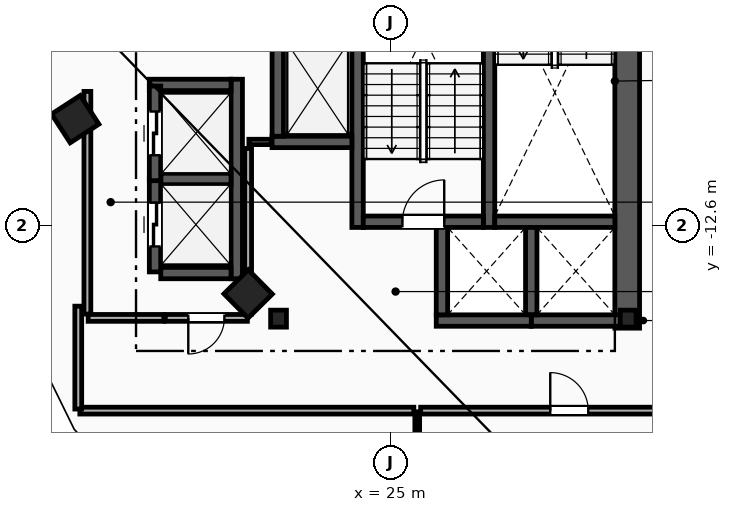
"""IFC4 building model, lengths in metres.
Left out: names, types, materials, properties, quantities, classifications, styles, units other than length and angle.
Written with IfcOpenShell. Run it as: python <this file> out.ifc"""

import sys

from ifc_helpers import new_model, si_unit, direction, frame, frame_2d, origin, origin_2d, place, context, subcontext, project, spatial, rectangle, i_section, extrude, element, fill, save


model = new_model("IFC4")
c1 = context("Model", 3, precision=1e-05, world=origin(), true_north=direction((0.0, 1.0)))
c2 = subcontext(c1, "Body", "Model", "MODEL_VIEW")
j1 = project(units=[si_unit("LENGTHUNIT", "METRE"), si_unit("PLANEANGLEUNIT", "RADIAN")], contexts=[c1])
p1 = place(None, origin())
s1 = spatial("IfcSite", under=j1, at=p1, CompositionType="ELEMENT")
p2 = place(p1, origin())
s2 = spatial("IfcBuilding", under=s1, at=p2, CompositionType="ELEMENT")
p3 = place(p2, frame((0.0, 0.0, 213.4)))
s3 = spatial("IfcBuildingStorey", under=s2, at=p3, CompositionType="ELEMENT", Elevation=213.4)
for number, where, z_axis, x_axis in (
    (1, (22.05, -15.05, 0.0), (0.0, 0.0, 1.0), (1.0, 0.0, 0.0)),
    (2, (31.25, -15.05, 0.0), (0.0, 0.0, 1.0), (1.0, 0.0, 0.0)),
):
    element("IfcColumn", number, at=place(p3, frame(where, z_axis=z_axis, x_axis=x_axis)), inside=s3, PredefinedType="COLUMN", context=c2, shape_type="SweptSolid", body=[
        extrude(i_section(OverallWidth=0.416, OverallDepth=0.446, WebThickness=0.039, FlangeThickness=0.063, FilletRadius=0.018, at=origin_2d()), origin(), (0.0, 0.0, 1.0), 3.6),
    ])
for number, where, z_axis, x_axis in (
    (3, (16.7, -9.8, 0.0), (0.0, 0.0, 1.0), (0.544, -0.839, 0.0)),
    (4, (21.25, -14.4, 0.0), (0.0, 0.0, 1.0), (0.703, -0.711, 0.0)),
):
    element("IfcColumn", number, at=place(p3, frame(where, z_axis=z_axis, x_axis=x_axis)), inside=s3, PredefinedType="COLUMN", context=c2, shape_type="SweptSolid", body=[
        extrude(rectangle(XDim=0.9, YDim=0.9, at=origin_2d()), origin(), (0.0, 0.0, 1.0), 3.6),
    ])
p4 = place(p3, frame((31.225, -15.3, 0.0), z_axis=(0.0, 0.0, 1.0), x_axis=(0.0, 1.0, 0.0)))
e5 = element("IfcWall", 5, at=p4, inside=s3, PredefinedType="SHEAR", context=c2, shape_type="SweptSolid", body=[
    extrude(rectangle(XDim=13.33, YDim=0.65, at=frame_2d((6.665, 0.0))), origin(), (0.0, 0.0, 1.0), 3.34),
])
for number, where, z_axis, x_axis in (
    (6, (27.59, -12.65, 0.0), (0.0, 0.0, 1.0), (0.0, 1.0, 0.0)),
    (7, (24.13, -12.65, 0.0), (0.0, 0.0, 1.0), (0.0, 1.0, 0.0)),
):
    element("IfcWall", number, at=place(p3, frame(where, z_axis=z_axis, x_axis=x_axis)), inside=s3, PredefinedType="SHEAR", context=c2, shape_type="SweptSolid", body=[
        extrude(rectangle(XDim=10.68, YDim=0.3, at=frame_2d((5.34, 0.0))), origin(), (0.0, 0.0, 1.0), 3.34),
    ])
p5 = place(p3, frame((27.74, -12.5, 0.0), z_axis=(0.0, 0.0, 1.0), x_axis=(1.0, 0.0, 0.0)))
e8 = element("IfcWall", 8, at=p5, inside=s3, PredefinedType="SHEAR", context=c2, shape_type="SweptSolid", body=[
    extrude(rectangle(XDim=3.16, YDim=0.3, at=frame_2d((1.58, 0.0))), origin(), (0.0, 0.0, 1.0), 3.34),
])
p6 = place(p3, frame((24.28, -12.5, 0.0), z_axis=(0.0, 0.0, 1.0), x_axis=(1.0, 0.0, 0.0)))
e9 = element("IfcWall", 9, at=p6, inside=s3, PredefinedType="SHEAR", context=c2, shape_type="SweptSolid", body=[
    extrude(rectangle(XDim=3.16, YDim=0.3, at=frame_2d((1.58, 0.0))), origin(), (0.0, 0.0, 1.0), 3.34),
])
p7 = place(p6, frame((1.03, 0.0, 0.0)))
e10 = element("IfcOpeningElement", 10, at=p7, cuts=e9, PredefinedType="OPENING", context=c2, shape_type="SweptSolid", body=[
    extrude(rectangle(XDim=1.1, YDim=2.15, at=frame_2d((0.55, 1.075))), frame((0.0, 0.16, 0.0), z_axis=(0.0, -1.0, 0.0), x_axis=(1.0, 0.0, 0.0)), (0.0, 0.0, 1.0), 0.32),
])
p8 = place(p3, frame((21.88, -10.4, 0.0), z_axis=(0.0, 0.0, 1.0), x_axis=(1.0, 0.0, 0.0)))
e11 = element("IfcWall", 11, at=p8, inside=s3, PredefinedType="SHEAR", context=c2, shape_type="SweptSolid", body=[
    extrude(rectangle(XDim=2.1, YDim=0.3, at=frame_2d((1.05, 0.0))), origin(), (0.0, 0.0, 1.0), 3.34),
])
for number, where, z_axis, x_axis in (
    (12, (22.03, -10.25, 0.0), (0.0, 0.0, 1.0), (0.0, 1.0, 0.0)),
    (13, (28.7, -15.1, 0.0), (0.0, 0.0, 1.0), (1.0, 0.0, 0.0)),
):
    element("IfcWall", number, at=place(p3, frame(where, z_axis=z_axis, x_axis=x_axis)), inside=s3, PredefinedType="SHEAR", context=c2, shape_type="SweptSolid", body=[
        extrude(rectangle(XDim=2.5, YDim=0.3, at=frame_2d((1.25, 0.0))), origin(), (0.0, 0.0, 1.0), 3.34),
    ])
p9 = place(p3, frame((28.7, -14.95, 0.0), z_axis=(0.0, 0.0, 1.0), x_axis=(0.0, 1.0, 0.0)))
e14 = element("IfcWall", 14, at=p9, inside=s3, PredefinedType="SHEAR", context=c2, shape_type="SweptSolid", body=[
    extrude(rectangle(XDim=2.3, YDim=0.3, at=frame_2d((1.15, 0.0))), origin(), (0.0, 0.0, 1.0), 3.34),
])
p10 = place(p3, frame((26.2, -15.1, 0.0), z_axis=(0.0, 0.0, 1.0), x_axis=(1.0, 0.0, 0.0)))
e15 = element("IfcWall", 15, at=p10, inside=s3, PredefinedType="SHEAR", context=c2, shape_type="SweptSolid", body=[
    extrude(rectangle(XDim=2.5, YDim=0.3, at=frame_2d((1.25, 0.0))), origin(), (0.0, 0.0, 1.0), 3.34),
])
p11 = place(p3, frame((26.35, -14.95, 0.0), z_axis=(0.0, 0.0, 1.0), x_axis=(0.0, 1.0, 0.0)))
e16 = element("IfcWall", 16, at=p11, inside=s3, PredefinedType="SHEAR", context=c2, shape_type="SweptSolid", body=[
    extrude(rectangle(XDim=2.3, YDim=0.3, at=frame_2d((1.15, 0.0))), origin(), (0.0, 0.0, 1.0), 3.34),
])
p12 = place(p3, frame((20.95, -14.0, 0.0), z_axis=(0.0, 0.0, 1.0), x_axis=(0.0, 1.0, 0.0)))
e17 = element("IfcWall", 17, at=p12, inside=s3, PredefinedType="SHEAR", context=c2, shape_type="SweptSolid", body=[
    extrude(rectangle(XDim=5.25, YDim=0.3, at=frame_2d((2.625, 0.0))), origin(), (0.0, 0.0, 1.0), 3.34),
])
p13 = place(p3, frame((18.95, -13.85, 0.0), z_axis=(0.0, 0.0, 1.0), x_axis=(1.0, 0.0, 0.0)))
e18 = element("IfcWall", 18, at=p13, inside=s3, PredefinedType="SHEAR", context=c2, shape_type="SweptSolid", body=[
    extrude(rectangle(XDim=1.85, YDim=0.3, at=frame_2d((0.925, 0.0))), origin(), (0.0, 0.0, 1.0), 3.34),
])
p14 = place(p3, frame((18.65, -8.9, 0.0), z_axis=(0.0, 0.0, 1.0), x_axis=(1.0, 0.0, 0.0)))
e19 = element("IfcWall", 19, at=p14, inside=s3, PredefinedType="SHEAR", context=c2, shape_type="SweptSolid", body=[
    extrude(rectangle(XDim=2.15, YDim=0.3, at=frame_2d((1.075, 0.0))), origin(), (0.0, 0.0, 1.0), 3.34),
])
p15 = place(p3, frame((18.95, -11.375, 0.0), z_axis=(0.0, 0.0, 1.0), x_axis=(1.0, 0.0, 0.0)))
e20 = element("IfcWall", 20, at=p15, inside=s3, PredefinedType="SHEAR", context=c2, shape_type="SweptSolid", body=[
    extrude(rectangle(XDim=1.85, YDim=0.3, at=frame_2d((0.925, 0.0))), origin(), (0.0, 0.0, 1.0), 3.34),
])
p16 = place(p3, frame((18.8, -13.82, 0.0), z_axis=(0.0, 0.0, 1.0), x_axis=(0.0, 1.0, 0.0)))
e21 = element("IfcWall", 21, at=p16, inside=s3, PredefinedType="SHEAR", context=c2, shape_type="SweptSolid", body=[
    extrude(rectangle(XDim=2.49, YDim=0.3, at=frame_2d((1.245, 0.0))), origin(), (0.0, 0.0, 1.0), 3.34),
])
p17 = place(p16, frame((0.67, 0.0, 0.0)))
e22 = element("IfcOpeningElement", 22, at=p17, cuts=e21, PredefinedType="OPENING", context=c2, shape_type="SweptSolid", body=[
    extrude(rectangle(XDim=1.15, YDim=2.2, at=frame_2d((0.575, 1.1))), frame((0.0, 0.16, 0.0), z_axis=(0.0, -1.0, 0.0), x_axis=(1.0, 0.0, 0.0)), (0.0, 0.0, 1.0), 0.32),
])
p18 = place(p3, frame((18.8, -11.42, 0.0), z_axis=(0.0, 0.0, 1.0), x_axis=(0.0, 1.0, 0.0)))
e23 = element("IfcWall", 23, at=p18, inside=s3, PredefinedType="SHEAR", context=c2, shape_type="SweptSolid", body=[
    extrude(rectangle(XDim=2.49, YDim=0.3, at=frame_2d((1.245, 0.0))), origin(), (0.0, 0.0, 1.0), 3.34),
])
p19 = place(p18, frame((0.67, 0.0, 0.0)))
e24 = element("IfcOpeningElement", 24, at=p19, cuts=e23, PredefinedType="OPENING", context=c2, shape_type="SweptSolid", body=[
    extrude(rectangle(XDim=1.15, YDim=2.2, at=frame_2d((0.575, 1.1))), frame((0.0, 0.16, 0.0), z_axis=(0.0, -1.0, 0.0), x_axis=(1.0, 0.0, 0.0)), (0.0, 0.0, 1.0), 0.32),
])
p20 = place(p3, frame((17.02, -14.93, 0.0), z_axis=(0.0, 0.0, 1.0), x_axis=(0.0, 1.0, 0.0)))
e25 = element("IfcWall", 25, at=p20, inside=s3, PredefinedType="PARTITIONING", context=c2, shape_type="SweptSolid", body=[
    extrude(rectangle(XDim=5.86, YDim=0.18, at=frame_2d((2.93, 0.0))), origin(), (0.0, 0.0, 1.0), 3.34),
])
p21 = place(p3, frame((17.04, -15.03, 0.0), z_axis=(0.0, 0.0, 1.0), x_axis=(1.0, 0.0, 0.0)))
e26 = element("IfcWall", 26, at=p21, inside=s3, PredefinedType="PARTITIONING", context=c2, shape_type="SweptSolid", body=[
    extrude(rectangle(XDim=1.99, YDim=0.18, at=frame_2d((0.995, 0.0))), origin(), (0.0, 0.0, 1.0), 3.34),
])
p22 = place(p3, frame((21.23, -15.03, 0.0), z_axis=(0.0, 0.0, 1.0), x_axis=(-1.0, 0.0, 0.0)))
e27 = element("IfcWall", 27, at=p22, inside=s3, PredefinedType="PARTITIONING", context=c2, shape_type="SweptSolid", body=[
    extrude(rectangle(XDim=2.16, YDim=0.18, at=frame_2d((1.08, 0.0))), origin(), (0.0, 0.0, 1.0), 3.34),
])
p23 = place(p22, frame((0.605, 0.0, 0.0)))
e28 = element("IfcOpeningElement", 28, at=p23, cuts=e27, PredefinedType="OPENING", context=c2, shape_type="SweptSolid", body=[
    extrude(rectangle(XDim=0.95, YDim=2.1, at=frame_2d((0.475, 1.05))), frame((0.0, 0.1, 0.0), z_axis=(0.0, -1.0, 0.0), x_axis=(1.0, 0.0, 0.0)), (0.0, 0.0, 1.0), 0.2),
])
p24 = place(p3, frame((21.27, -10.4, 0.0), z_axis=(0.0, 0.0, 1.0), x_axis=(1.0, 0.0, 0.0)))
e29 = element("IfcWall", 29, at=p24, inside=s3, PredefinedType="PARTITIONING", context=c2, shape_type="SweptSolid", body=[
    extrude(rectangle(XDim=0.59, YDim=0.14, at=frame_2d((0.295, 0.0))), origin(), (0.0, 0.0, 1.0), 3.34),
])
p25 = place(p3, frame((21.25, -14.93, 0.0), z_axis=(0.0, 0.0, 1.0), x_axis=(0.0, 1.0, 0.0)))
e30 = element("IfcWall", 30, at=p25, inside=s3, PredefinedType="PARTITIONING", context=c2, shape_type="SweptSolid", body=[
    extrude(rectangle(XDim=4.36, YDim=0.18, at=frame_2d((2.18, 0.0))), origin(), (0.0, 0.0, 1.0), 3.34),
])
p26 = place(p3, frame((25.7, -24.265, 0.0), z_axis=(0.0, 0.0, 1.0), x_axis=(0.0, 1.0, 0.0)))
e31 = element("IfcWall", 31, at=p26, inside=s3, PredefinedType="PARTITIONING", context=c2, shape_type="SweptSolid", body=[
    extrude(rectangle(XDim=6.765, YDim=0.125, at=frame_2d((3.382, 0.0))), origin(), (0.0, 0.0, 1.0), 3.34),
])
p27 = place(p3, frame((25.79, -17.47, 0.0), z_axis=(0.0, 0.0, 1.0), x_axis=(1.0, 0.0, 0.0)))
e32 = element("IfcWall", 32, at=p27, inside=s3, PredefinedType="PARTITIONING", context=c2, shape_type="SweptSolid", body=[
    extrude(rectangle(XDim=7.82, YDim=0.18, at=frame_2d((3.91, 0.0))), origin(), (0.0, 0.0, 1.0), 3.34),
])
p28 = place(p27, frame((3.41, 0.0, 0.0)))
e33 = element("IfcOpeningElement", 33, at=p28, cuts=e32, PredefinedType="OPENING", context=c2, shape_type="SweptSolid", body=[
    extrude(rectangle(XDim=1.0, YDim=2.15, at=frame_2d((0.5, 1.075))), frame((0.0, 0.1, 0.0), z_axis=(0.0, -1.0, 0.0), x_axis=(1.0, 0.0, 0.0)), (0.0, 0.0, 1.0), 0.2),
])
p29 = place(p3, frame((16.822, -17.47, 0.0), z_axis=(0.0, 0.0, 1.0), x_axis=(1.0, 0.0, 0.0)))
e34 = element("IfcWall", 34, at=p29, inside=s3, PredefinedType="PARTITIONING", context=c2, shape_type="SweptSolid", body=[
    extrude(rectangle(XDim=8.789, YDim=0.18, at=frame_2d((4.394, 0.0))), origin(), (0.0, 0.0, 1.0), 3.34),
])
p30 = place(p3, frame((16.78, -14.721, 0.0), z_axis=(0.0, 0.0, 1.0), x_axis=(0.0, -1.0, 0.0)))
e35 = element("IfcWall", 35, at=p30, inside=s3, PredefinedType="PARTITIONING", context=c2, shape_type="SweptSolid", body=[
    extrude(rectangle(XDim=2.707, YDim=0.18, at=frame_2d((1.354, 0.0))), origin(), (0.0, 0.0, 1.0), 3.34),
])
p31 = place(p7, origin())
e36 = element("IfcDoor", 36, at=p31, inside=s3, OperationType="SINGLE_SWING_RIGHT", PredefinedType="DOOR", context=c2, shape_type="SweptSolid", body=[
    extrude(rectangle(XDim=1.1, YDim=2.15, at=frame_2d((0.55, 1.075))), frame((0.0, 0.025, 0.0), z_axis=(0.0, -1.0, 0.0), x_axis=(1.0, 0.0, 0.0)), (0.0, 0.0, 1.0), 0.05),
])
fill(e10, e36)
p32 = place(p17, origin())
e37 = element("IfcDoor", 37, at=p32, inside=s3, OperationType="SLIDING_TO_LEFT", PredefinedType="TRAPDOOR", context=c2, shape_type="SweptSolid", body=[
    extrude(rectangle(XDim=1.15, YDim=2.2, at=frame_2d((0.575, 1.1))), frame((0.0, 0.025, 0.0), z_axis=(0.0, -1.0, 0.0), x_axis=(1.0, 0.0, 0.0)), (0.0, 0.0, 1.0), 0.05),
])
fill(e22, e37)
p33 = place(p19, origin())
e38 = element("IfcDoor", 38, at=p33, inside=s3, OperationType="SLIDING_TO_LEFT", PredefinedType="TRAPDOOR", context=c2, shape_type="SweptSolid", body=[
    extrude(rectangle(XDim=1.15, YDim=2.2, at=frame_2d((0.575, 1.1))), frame((0.0, 0.025, 0.0), z_axis=(0.0, -1.0, 0.0), x_axis=(1.0, 0.0, 0.0)), (0.0, 0.0, 1.0), 0.05),
])
fill(e24, e38)
p34 = place(p28, origin())
e39 = element("IfcDoor", 39, at=p34, inside=s3, OperationType="SINGLE_SWING_LEFT", PredefinedType="DOOR", context=c2, shape_type="SweptSolid", body=[
    extrude(rectangle(XDim=1.0, YDim=2.15, at=frame_2d((0.5, 1.075))), frame((0.0, 0.025, 0.0), z_axis=(0.0, -1.0, 0.0), x_axis=(1.0, 0.0, 0.0)), (0.0, 0.0, 1.0), 0.05),
])
fill(e33, e39)
p35 = place(p23, origin())
e40 = element("IfcDoor", 40, at=p35, inside=s3, OperationType="SINGLE_SWING_RIGHT", PredefinedType="DOOR", context=c2, shape_type="SweptSolid", body=[
    extrude(rectangle(XDim=0.95, YDim=2.1, at=frame_2d((0.475, 1.05))), frame((0.0, 0.025, 0.0), z_axis=(0.0, -1.0, 0.0), x_axis=(1.0, 0.0, 0.0)), (0.0, 0.0, 1.0), 0.05),
])
fill(e28, e40)
save(model, sys.argv[1])
